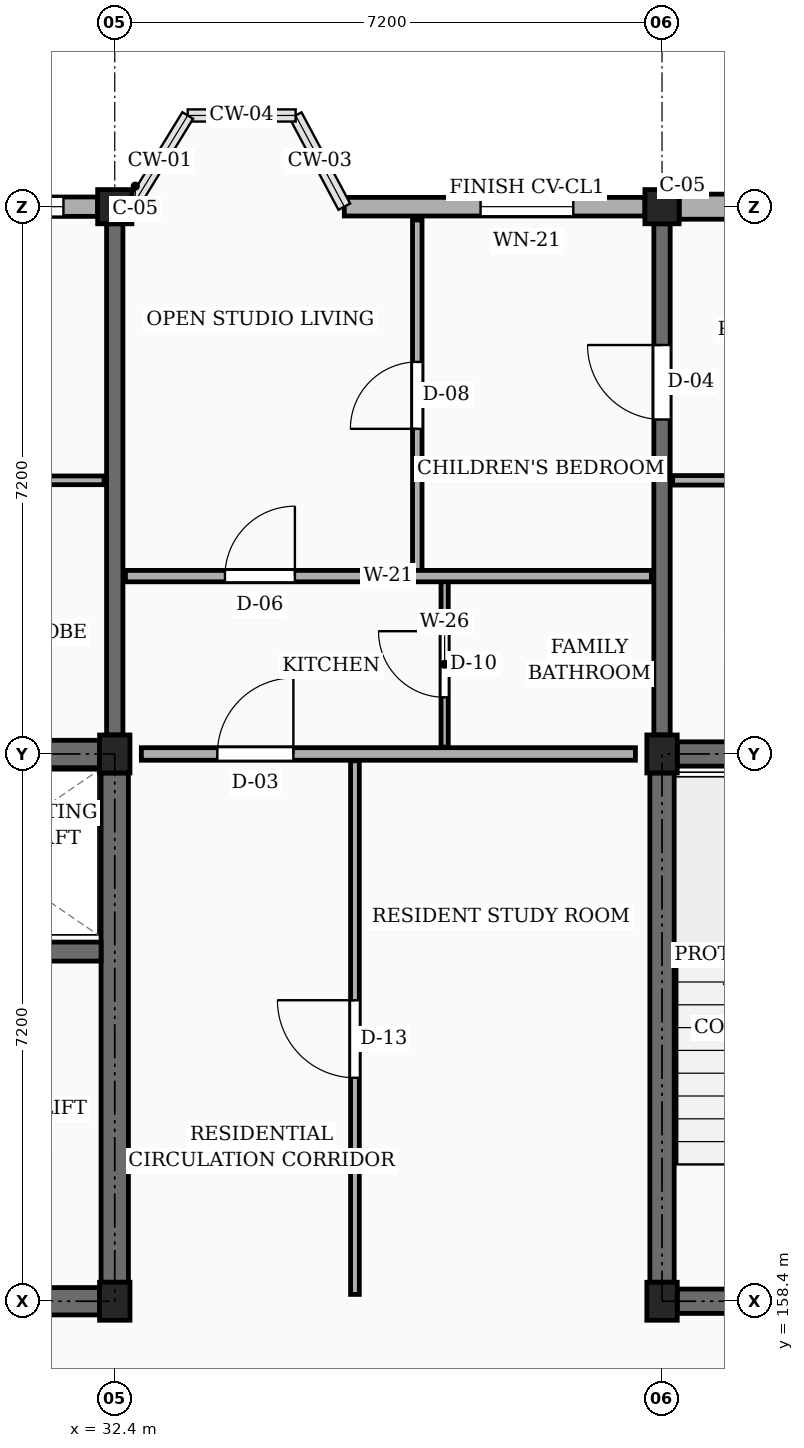
"""IFC4 building model, lengths in metres.
Left out: names, types, materials, properties, quantities, classifications, styles, units other than length and angle.
Written with IfcOpenShell. Run it as: python <this file> out.ifc"""

import sys

from ifc_helpers import new_model, si_unit, direction, frame, frame_2d, origin, origin_2d, place, context, subcontext, project, spatial, rectangle, extrude, element, fill, save


model = new_model("IFC4")
c1 = context("Model", 3, precision=1e-05, world=origin(), true_north=direction((0.0, 1.0)))
c2 = subcontext(c1, "Body", "Model", "MODEL_VIEW")
j1 = project(units=[si_unit("LENGTHUNIT", "METRE"), si_unit("PLANEANGLEUNIT", "RADIAN")], contexts=[c1])
p1 = place(None, origin())
s1 = spatial("IfcSite", under=j1, at=p1, CompositionType="ELEMENT")
p2 = place(p1, origin())
s2 = spatial("IfcBuilding", under=s1, at=p2, CompositionType="ELEMENT")
p3 = place(p2, frame((0.0, 0.0, 36.0)))
s3 = spatial("IfcBuildingStorey", under=s2, at=p3, CompositionType="ELEMENT", Elevation=36.0)
for number, where, z_axis, x_axis in (
    (1, (32.4, 158.4, 0.0), (0.0, 0.0, 1.0), (1.0, 0.0, 0.0)),
    (2, (32.4, 165.6, 0.0), (0.0, 0.0, 1.0), (1.0, 0.0, 0.0)),
):
    element("IfcColumn", number, at=place(p3, frame(where, z_axis=z_axis, x_axis=x_axis)), inside=s3, PredefinedType="COLUMN", context=c2, shape_type="SweptSolid", body=[
        extrude(rectangle(XDim=0.4, YDim=0.5, at=origin_2d()), origin(), (0.0, 0.0, 1.0), 3.15),
    ])
p4 = place(p3, frame((32.4, 172.8, 0.0), z_axis=(0.0, 0.0, 1.0), x_axis=(1.0, 0.0, 0.0)))
e3 = element("IfcColumn", 3, at=p4, inside=s3, PredefinedType="COLUMN", context=c2, shape_type="SweptSolid", body=[
    extrude(rectangle(XDim=0.45, YDim=0.45, at=origin_2d()), origin(), (0.0, 0.0, 1.0), 3.15),
])
for number, where, z_axis, x_axis in (
    (4, (39.6, 158.4, 0.0), (0.0, 0.0, 1.0), (1.0, 0.0, 0.0)),
    (5, (39.6, 165.6, 0.0), (0.0, 0.0, 1.0), (1.0, 0.0, 0.0)),
):
    element("IfcColumn", number, at=place(p3, frame(where, z_axis=z_axis, x_axis=x_axis)), inside=s3, PredefinedType="COLUMN", context=c2, shape_type="SweptSolid", body=[
        extrude(rectangle(XDim=0.4, YDim=0.5, at=origin_2d()), origin(), (0.0, 0.0, 1.0), 3.15),
    ])
p5 = place(p3, frame((39.6, 172.8, 0.0), z_axis=(0.0, 0.0, 1.0), x_axis=(1.0, 0.0, 0.0)))
e6 = element("IfcColumn", 6, at=p5, inside=s3, PredefinedType="COLUMN", context=c2, shape_type="SweptSolid", body=[
    extrude(rectangle(XDim=0.45, YDim=0.45, at=origin_2d()), origin(), (0.0, 0.0, 1.0), 3.15),
])
p6 = place(p3, frame((32.4, 165.85, 0.0), z_axis=(0.0, 0.0, 1.0), x_axis=(0.0, 1.0, 0.0)))
e7 = element("IfcWall", 7, at=p6, inside=s3, PredefinedType="SOLIDWALL", context=c2, shape_type="SweptSolid", body=[
    extrude(rectangle(XDim=6.725, YDim=0.215, at=frame_2d((3.362, 0.0))), origin(), (0.0, 0.0, 1.0), 2.185),
])
p7 = place(p3, frame((39.6, 165.85, 0.0), z_axis=(0.0, 0.0, 1.0), x_axis=(0.0, 1.0, 0.0)))
e8 = element("IfcWall", 8, at=p7, inside=s3, PredefinedType="SOLIDWALL", context=c2, shape_type="SweptSolid", body=[
    extrude(rectangle(XDim=6.725, YDim=0.215, at=frame_2d((3.362, 0.0))), origin(), (0.0, 0.0, 1.0), 2.185),
])
p8 = place(p7, frame((4.15, 0.0, 0.0)))
e9 = element("IfcOpeningElement", 9, at=p8, cuts=e8, PredefinedType="OPENING", context=c2, shape_type="SweptSolid", body=[
    extrude(rectangle(XDim=0.98, YDim=2.12, at=frame_2d((0.49, 1.06))), frame((0.0, 0.118, 0.0), z_axis=(0.0, -1.0, 0.0), x_axis=(1.0, 0.0, 0.0)), (0.0, 0.0, 1.0), 0.235),
])
p9 = place(p3, frame((46.575, 172.8, 0.0), z_axis=(0.0, 0.0, 1.0), x_axis=(-1.0, 0.0, 0.0)))
e10 = element("IfcWall", 10, at=p9, inside=s3, PredefinedType="SOLIDWALL", context=c2, shape_type="SweptSolid", body=[
    extrude(rectangle(XDim=6.75, YDim=0.33, at=frame_2d((3.375, 0.0))), origin(), (0.0, 0.0, 1.0), 2.455),
])
p10 = place(p9, frame((0.45, 0.0, 0.78)))
e11 = element("IfcOpeningElement", 11, at=p10, cuts=e10, PredefinedType="OPENING", context=c2, shape_type="SweptSolid", body=[
    extrude(rectangle(XDim=1.06, YDim=1.36, at=frame_2d((0.53, 0.68))), frame((0.0, 0.175, 0.0), z_axis=(0.0, -1.0, 0.0), x_axis=(1.0, 0.0, 0.0)), (0.0, 0.0, 1.0), 0.35),
])
p11 = place(p9, frame((4.65, 0.0, 0.78)))
e12 = element("IfcOpeningElement", 12, at=p11, cuts=e10, PredefinedType="OPENING", context=c2, shape_type="SweptSolid", body=[
    extrude(rectangle(XDim=1.22, YDim=1.36, at=frame_2d((0.61, 0.68))), frame((0.0, 0.175, 0.0), z_axis=(0.0, -1.0, 0.0), x_axis=(1.0, 0.0, 0.0)), (0.0, 0.0, 1.0), 0.35),
])
p12 = place(p3, frame((39.375, 172.8, 0.0), z_axis=(0.0, 0.0, 1.0), x_axis=(-1.0, 0.0, 0.0)))
e13 = element("IfcWall", 13, at=p12, inside=s3, PredefinedType="SOLIDWALL", context=c2, shape_type="SweptSolid", body=[
    extrude(rectangle(XDim=3.955, YDim=0.245, at=frame_2d((1.978, 0.0))), origin(), (0.0, 0.0, 1.0), 2.455),
])
p13 = place(p12, frame((0.942, 0.0, 0.78)))
e14 = element("IfcOpeningElement", 14, at=p13, cuts=e13, PredefinedType="OPENING", context=c2, shape_type="SweptSolid", body=[
    extrude(rectangle(XDim=1.22, YDim=1.36, at=frame_2d((0.61, 0.68))), frame((0.0, 0.133, 0.0), z_axis=(0.0, -1.0, 0.0), x_axis=(1.0, 0.0, 0.0)), (0.0, 0.0, 1.0), 0.265),
])
p14 = place(p3, frame((32.175, 172.8, 0.0), z_axis=(0.0, 0.0, 1.0), x_axis=(-1.0, 0.0, 0.0)))
e15 = element("IfcWall", 15, at=p14, inside=s3, PredefinedType="SOLIDWALL", context=c2, shape_type="SweptSolid", body=[
    extrude(rectangle(XDim=6.75, YDim=0.255, at=frame_2d((3.375, 0.0))), origin(), (0.0, 0.0, 1.0), 2.455),
])
p15 = place(p14, frame((0.45, 0.0, 0.78)))
e16 = element("IfcOpeningElement", 16, at=p15, cuts=e15, PredefinedType="OPENING", context=c2, shape_type="SweptSolid", body=[
    extrude(rectangle(XDim=1.3, YDim=1.36, at=frame_2d((0.65, 0.68))), frame((0.0, 0.137, 0.0), z_axis=(0.0, -1.0, 0.0), x_axis=(1.0, 0.0, 0.0)), (0.0, 0.0, 1.0), 0.275),
])
p16 = place(p14, frame((4.65, 0.0, 0.78)))
e17 = element("IfcOpeningElement", 17, at=p16, cuts=e15, PredefinedType="OPENING", context=c2, shape_type="SweptSolid", body=[
    extrude(rectangle(XDim=1.46, YDim=1.36, at=frame_2d((0.73, 0.68))), frame((0.0, 0.137, 0.0), z_axis=(0.0, -1.0, 0.0), x_axis=(1.0, 0.0, 0.0)), (0.0, 0.0, 1.0), 0.275),
])
p17 = place(p3, frame((25.4, 165.6, 0.0), z_axis=(0.0, 0.0, 1.0), x_axis=(1.0, 0.0, 0.0)))
e18 = element("IfcWall", 18, at=p17, inside=s3, PredefinedType="SHEAR", context=c2, shape_type="SweptSolid", body=[
    extrude(rectangle(XDim=6.8, YDim=0.36, at=frame_2d((3.4, 0.0))), origin(), (0.0, 0.0, 1.0), 2.885),
])
p18 = place(p3, frame((32.4, 158.65, 0.0), z_axis=(0.0, 0.0, 1.0), x_axis=(0.0, 1.0, 0.0)))
e19 = element("IfcWall", 19, at=p18, inside=s3, PredefinedType="SHEAR", context=c2, shape_type="SweptSolid", body=[
    extrude(rectangle(XDim=6.7, YDim=0.36, at=frame_2d((3.35, 0.0))), origin(), (0.0, 0.0, 1.0), 2.885),
])
p19 = place(p3, frame((25.4, 158.4, 0.0), z_axis=(0.0, 0.0, 1.0), x_axis=(1.0, 0.0, 0.0)))
e20 = element("IfcWall", 20, at=p19, inside=s3, PredefinedType="SHEAR", context=c2, shape_type="SweptSolid", body=[
    extrude(rectangle(XDim=6.8, YDim=0.36, at=frame_2d((3.4, 0.0))), origin(), (0.0, 0.0, 1.0), 2.885),
])
p20 = place(p19, frame((4.55, 0.0, 0.0)))
e21 = element("IfcOpeningElement", 21, at=p20, cuts=e20, PredefinedType="OPENING", context=c2, shape_type="SweptSolid", body=[
    extrude(rectangle(XDim=1.1, YDim=2.15, at=frame_2d((0.55, 1.075))), frame((0.0, 0.19, 0.0), z_axis=(0.0, -1.0, 0.0), x_axis=(1.0, 0.0, 0.0)), (0.0, 0.0, 1.0), 0.38),
])
p21 = place(p3, frame((28.925, 163.0, 0.0), z_axis=(0.0, 0.0, 1.0), x_axis=(1.0, 0.0, 0.0)))
e22 = element("IfcWall", 22, at=p21, inside=s3, PredefinedType="SHEAR", context=c2, shape_type="SweptSolid", body=[
    extrude(rectangle(XDim=3.295, YDim=0.25, at=frame_2d((1.647, 0.0))), origin(), (0.0, 0.0, 1.0), 2.885),
])
p22 = place(p21, frame((1.1, 0.0, 0.0)))
e23 = element("IfcOpeningElement", 23, at=p22, cuts=e22, PredefinedType="OPENING", context=c2, shape_type="SweptSolid", body=[
    extrude(rectangle(XDim=1.1, YDim=2.2, at=frame_2d((0.55, 1.1))), frame((0.0, 0.135, 0.0), z_axis=(0.0, -1.0, 0.0), x_axis=(1.0, 0.0, 0.0)), (0.0, 0.0, 1.0), 0.27),
])
p23 = place(p3, frame((39.6, 158.65, 0.0), z_axis=(0.0, 0.0, 1.0), x_axis=(0.0, 1.0, 0.0)))
e24 = element("IfcWall", 24, at=p23, inside=s3, PredefinedType="SHEAR", context=c2, shape_type="SweptSolid", body=[
    extrude(rectangle(XDim=6.7, YDim=0.32, at=frame_2d((3.35, 0.0))), origin(), (0.0, 0.0, 1.0), 2.885),
])
p24 = place(p3, frame((39.8, 165.6, 0.0), z_axis=(0.0, 0.0, 1.0), x_axis=(1.0, 0.0, 0.0)))
e25 = element("IfcWall", 25, at=p24, inside=s3, PredefinedType="SHEAR", context=c2, shape_type="SweptSolid", body=[
    extrude(rectangle(XDim=6.8, YDim=0.32, at=frame_2d((3.4, 0.0))), origin(), (0.0, 0.0, 1.0), 2.885),
])
p25 = place(p3, frame((39.8, 158.4, 0.0), z_axis=(0.0, 0.0, 1.0), x_axis=(1.0, 0.0, 0.0)))
e26 = element("IfcWall", 26, at=p25, inside=s3, PredefinedType="SHEAR", context=c2, shape_type="SweptSolid", body=[
    extrude(rectangle(XDim=6.8, YDim=0.32, at=frame_2d((3.4, 0.0))), origin(), (0.0, 0.0, 1.0), 2.885),
])
p26 = place(p25, frame((4.55, 0.0, 0.0)))
e27 = element("IfcOpeningElement", 27, at=p26, cuts=e26, PredefinedType="OPENING", context=c2, shape_type="SweptSolid", body=[
    extrude(rectangle(XDim=1.1, YDim=2.15, at=frame_2d((0.55, 1.075))), frame((0.0, 0.17, 0.0), z_axis=(0.0, -1.0, 0.0), x_axis=(1.0, 0.0, 0.0)), (0.0, 0.0, 1.0), 0.34),
])
p27 = place(p3, frame((32.75, 165.6, 0.0), z_axis=(0.0, 0.0, 1.0), x_axis=(1.0, 0.0, 0.0)))
e28 = element("IfcWall", 28, at=p27, inside=s3, PredefinedType="PARTITIONING", context=c2, shape_type="SweptSolid", body=[
    extrude(rectangle(XDim=6.5, YDim=0.165, at=frame_2d((3.25, 0.0))), origin(), (0.0, 0.0, 1.0), 2.32),
])
p28 = place(p27, frame((1.0, 0.0, 0.0)))
e29 = element("IfcOpeningElement", 29, at=p28, cuts=e28, PredefinedType="OPENING", context=c2, shape_type="SweptSolid", body=[
    extrude(rectangle(XDim=1.0, YDim=2.15, at=frame_2d((0.5, 1.075))), frame((0.0, 0.093, 0.0), z_axis=(0.0, -1.0, 0.0), x_axis=(1.0, 0.0, 0.0)), (0.0, 0.0, 1.0), 0.185),
])
p29 = place(p3, frame((25.34, 169.2, 0.0), z_axis=(0.0, 0.0, 1.0), x_axis=(1.0, 0.0, 0.0)))
e30 = element("IfcWall", 30, at=p29, inside=s3, PredefinedType="PARTITIONING", context=c2, shape_type="SweptSolid", body=[
    extrude(rectangle(XDim=6.92, YDim=0.115, at=frame_2d((3.46, 0.0))), origin(), (0.0, 0.0, 1.0), 2.32),
])
p30 = place(p29, frame((1.05, 0.0, 0.0)))
e31 = element("IfcOpeningElement", 31, at=p30, cuts=e30, PredefinedType="OPENING", context=c2, shape_type="SweptSolid", body=[
    extrude(rectangle(XDim=0.87, YDim=2.05, at=frame_2d((0.435, 1.025))), frame((0.0, 0.067, 0.0), z_axis=(0.0, -1.0, 0.0), x_axis=(1.0, 0.0, 0.0)), (0.0, 0.0, 1.0), 0.135),
])
p31 = place(p29, frame((4.45, 0.0, 0.0)))
e32 = element("IfcOpeningElement", 32, at=p31, cuts=e30, PredefinedType="OPENING", context=c2, shape_type="SweptSolid", body=[
    extrude(rectangle(XDim=0.88, YDim=2.08, at=frame_2d((0.44, 1.04))), frame((0.0, 0.067, 0.0), z_axis=(0.0, -1.0, 0.0), x_axis=(1.0, 0.0, 0.0)), (0.0, 0.0, 1.0), 0.135),
])
p32 = place(p3, frame((35.56, 158.49, 0.0), z_axis=(0.0, 0.0, 1.0), x_axis=(0.0, 1.0, 0.0)))
e33 = element("IfcWall", 33, at=p32, inside=s3, PredefinedType="PARTITIONING", context=c2, shape_type="SweptSolid", body=[
    extrude(rectangle(XDim=7.02, YDim=0.115, at=frame_2d((3.51, 0.0))), origin(), (0.0, 0.0, 1.0), 2.32),
])
p33 = place(p32, frame((2.85, 0.0, 0.0)))
e34 = element("IfcOpeningElement", 34, at=p33, cuts=e33, PredefinedType="OPENING", context=c2, shape_type="SweptSolid", body=[
    extrude(rectangle(XDim=1.02, YDim=2.15, at=frame_2d((0.51, 1.075))), frame((0.0, 0.067, 0.0), z_axis=(0.0, -1.0, 0.0), x_axis=(1.0, 0.0, 0.0)), (0.0, 0.0, 1.0), 0.135),
])
p34 = place(p3, frame((36.38, 168.01, 0.0), z_axis=(0.0, 0.0, 1.0), x_axis=(0.0, 1.0, 0.0)))
e35 = element("IfcWall", 35, at=p34, inside=s3, PredefinedType="PARTITIONING", context=c2, shape_type="SweptSolid", body=[
    extrude(rectangle(XDim=4.615, YDim=0.125, at=frame_2d((2.308, 0.0))), origin(), (0.0, 0.0, 1.0), 2.32),
])
p35 = place(p34, frame((1.867, 0.0, 0.0)))
e36 = element("IfcOpeningElement", 36, at=p35, cuts=e35, PredefinedType="OPENING", context=c2, shape_type="SweptSolid", body=[
    extrude(rectangle(XDim=0.88, YDim=2.08, at=frame_2d((0.44, 1.04))), frame((0.0, 0.073, 0.0), z_axis=(0.0, -1.0, 0.0), x_axis=(1.0, 0.0, 0.0)), (0.0, 0.0, 1.0), 0.145),
])
p36 = place(p3, frame((36.74, 165.69, 0.0), z_axis=(0.0, 0.0, 1.0), x_axis=(0.0, 1.0, 0.0)))
e37 = element("IfcWall", 37, at=p36, inside=s3, PredefinedType="PARTITIONING", context=c2, shape_type="SweptSolid", body=[
    extrude(rectangle(XDim=2.18, YDim=0.095, at=frame_2d((1.09, 0.0))), origin(), (0.0, 0.0, 1.0), 2.32),
])
p37 = place(p36, frame((0.655, 0.0, 0.0)))
e38 = element("IfcOpeningElement", 38, at=p37, cuts=e37, PredefinedType="OPENING", context=c2, shape_type="SweptSolid", body=[
    extrude(rectangle(XDim=0.87, YDim=2.05, at=frame_2d((0.435, 1.025))), frame((0.0, 0.058, 0.0), z_axis=(0.0, -1.0, 0.0), x_axis=(1.0, 0.0, 0.0)), (0.0, 0.0, 1.0), 0.115),
])
p38 = place(p3, frame((32.54, 167.94, 0.0), z_axis=(0.0, 0.0, 1.0), x_axis=(1.0, 0.0, 0.0)))
e39 = element("IfcWall", 39, at=p38, inside=s3, PredefinedType="PARTITIONING", context=c2, shape_type="SweptSolid", body=[
    extrude(rectangle(XDim=6.92, YDim=0.15, at=frame_2d((3.46, 0.0))), origin(), (0.0, 0.0, 1.0), 2.32),
])
p39 = place(p38, frame((1.31, 0.0, 0.0)))
e40 = element("IfcOpeningElement", 40, at=p39, cuts=e39, PredefinedType="OPENING", context=c2, shape_type="SweptSolid", body=[
    extrude(rectangle(XDim=0.92, YDim=2.1, at=frame_2d((0.46, 1.05))), frame((0.0, 0.085, 0.0), z_axis=(0.0, -1.0, 0.0), x_axis=(1.0, 0.0, 0.0)), (0.0, 0.0, 1.0), 0.17),
])
p40 = place(p3, frame((39.74, 169.2, 0.0), z_axis=(0.0, 0.0, 1.0), x_axis=(1.0, 0.0, 0.0)))
e41 = element("IfcWall", 41, at=p40, inside=s3, PredefinedType="PARTITIONING", context=c2, shape_type="SweptSolid", body=[
    extrude(rectangle(XDim=6.92, YDim=0.125, at=frame_2d((3.46, 0.0))), origin(), (0.0, 0.0, 1.0), 2.32),
])
p41 = place(p40, frame((1.05, 0.0, 0.0)))
e42 = element("IfcOpeningElement", 42, at=p41, cuts=e41, PredefinedType="OPENING", context=c2, shape_type="SweptSolid", body=[
    extrude(rectangle(XDim=0.87, YDim=2.05, at=frame_2d((0.435, 1.025))), frame((0.0, 0.073, 0.0), z_axis=(0.0, -1.0, 0.0), x_axis=(1.0, 0.0, 0.0)), (0.0, 0.0, 1.0), 0.145),
])
p42 = place(p40, frame((4.45, 0.0, 0.0)))
e43 = element("IfcOpeningElement", 43, at=p42, cuts=e41, PredefinedType="OPENING", context=c2, shape_type="SweptSolid", body=[
    extrude(rectangle(XDim=0.88, YDim=2.08, at=frame_2d((0.44, 1.04))), frame((0.0, 0.073, 0.0), z_axis=(0.0, -1.0, 0.0), x_axis=(1.0, 0.0, 0.0)), (0.0, 0.0, 1.0), 0.145),
])
p43 = place(p13, origin())
e44 = element("IfcWindow", 44, at=p43, inside=s3, PartitioningType="SINGLE_PANEL", PredefinedType="WINDOW", context=c2, shape_type="SweptSolid", body=[
    extrude(rectangle(XDim=1.22, YDim=1.36, at=frame_2d((0.61, 0.68))), frame((0.0, 0.03, 0.0), z_axis=(0.0, -1.0, 0.0), x_axis=(1.0, 0.0, 0.0)), (0.0, 0.0, 1.0), 0.06),
])
fill(e14, e44)
p44 = place(p15, origin())
e45 = element("IfcWindow", 45, at=p44, inside=s3, PartitioningType="SINGLE_PANEL", PredefinedType="WINDOW", context=c2, shape_type="SweptSolid", body=[
    extrude(rectangle(XDim=1.3, YDim=1.36, at=frame_2d((0.65, 0.68))), frame((0.0, 0.03, 0.0), z_axis=(0.0, -1.0, 0.0), x_axis=(1.0, 0.0, 0.0)), (0.0, 0.0, 1.0), 0.06),
])
fill(e16, e45)
p45 = place(p28, origin())
e46 = element("IfcDoor", 46, at=p45, inside=s3, OperationType="SINGLE_SWING_RIGHT", PredefinedType="DOOR", context=c2, shape_type="SweptSolid", body=[
    extrude(rectangle(XDim=1.0, YDim=2.15, at=frame_2d((0.5, 1.075))), frame((0.0, 0.025, 0.0), z_axis=(0.0, -1.0, 0.0), x_axis=(1.0, 0.0, 0.0)), (0.0, 0.0, 1.0), 0.05),
])
fill(e29, e46)
p46 = place(p33, origin())
e47 = element("IfcDoor", 47, at=p46, inside=s3, OperationType="SINGLE_SWING_RIGHT", PredefinedType="DOOR", context=c2, shape_type="SweptSolid", body=[
    extrude(rectangle(XDim=1.02, YDim=2.15, at=frame_2d((0.51, 1.075))), frame((0.0, 0.025, 0.0), z_axis=(0.0, -1.0, 0.0), x_axis=(1.0, 0.0, 0.0)), (0.0, 0.0, 1.0), 0.05),
])
fill(e34, e47)
p47 = place(p35, origin())
e48 = element("IfcDoor", 48, at=p47, inside=s3, OperationType="SINGLE_SWING_LEFT", PredefinedType="DOOR", context=c2, shape_type="SweptSolid", body=[
    extrude(rectangle(XDim=0.88, YDim=2.08, at=frame_2d((0.44, 1.04))), frame((0.0, 0.025, 0.0), z_axis=(0.0, -1.0, 0.0), x_axis=(1.0, 0.0, 0.0)), (0.0, 0.0, 1.0), 0.05),
])
fill(e36, e48)
p48 = place(p37, origin())
e49 = element("IfcDoor", 49, at=p48, inside=s3, OperationType="SINGLE_SWING_RIGHT", PredefinedType="DOOR", context=c2, shape_type="SweptSolid", body=[
    extrude(rectangle(XDim=0.87, YDim=2.05, at=frame_2d((0.435, 1.025))), frame((0.0, 0.025, 0.0), z_axis=(0.0, -1.0, 0.0), x_axis=(1.0, 0.0, 0.0)), (0.0, 0.0, 1.0), 0.05),
])
fill(e38, e49)
p49 = place(p39, origin())
e50 = element("IfcDoor", 50, at=p49, inside=s3, OperationType="SINGLE_SWING_RIGHT", PredefinedType="DOOR", context=c2, shape_type="SweptSolid", body=[
    extrude(rectangle(XDim=0.92, YDim=2.1, at=frame_2d((0.46, 1.05))), frame((0.0, 0.025, 0.0), z_axis=(0.0, -1.0, 0.0), x_axis=(1.0, 0.0, 0.0)), (0.0, 0.0, 1.0), 0.05),
])
fill(e40, e50)
p50 = place(p8, origin())
e51 = element("IfcDoor", 51, at=p50, inside=s3, OperationType="SINGLE_SWING_RIGHT", PredefinedType="DOOR", context=c2, shape_type="SweptSolid", body=[
    extrude(rectangle(XDim=0.98, YDim=2.12, at=frame_2d((0.49, 1.06))), frame((0.0, 0.025, 0.0), z_axis=(0.0, -1.0, 0.0), x_axis=(1.0, 0.0, 0.0)), (0.0, 0.0, 1.0), 0.05),
])
fill(e9, e51)
save(model, sys.argv[1])
